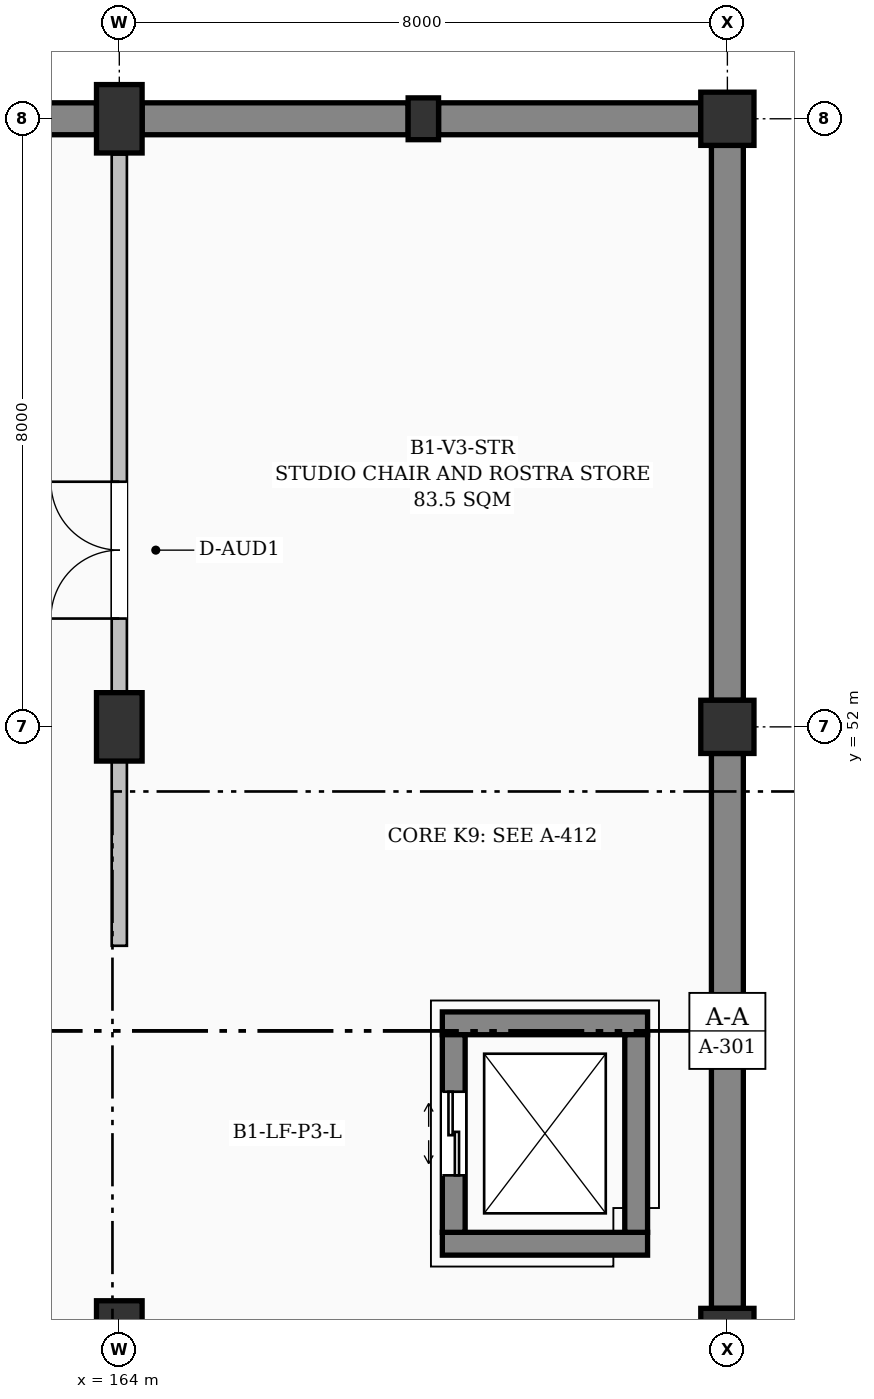
"""IFC4 building model, lengths in metres.
Left out: names, types, materials, properties, quantities, classifications, styles, units other than length and angle.
Written with IfcOpenShell. Run it as: python <this file> out.ifc"""

import sys

from ifc_helpers import new_model, si_unit, direction, frame, frame_2d, origin, origin_2d, place, context, subcontext, project, spatial, rectangle, extrude, element, fill, save


model = new_model("IFC4")
c1 = context("Model", 3, precision=1e-05, world=origin(), true_north=direction((0.0, 1.0)))
c2 = subcontext(c1, "Body", "Model", "MODEL_VIEW")
j1 = project(units=[si_unit("LENGTHUNIT", "METRE"), si_unit("PLANEANGLEUNIT", "RADIAN")], contexts=[c1])
p1 = place(None, origin())
s1 = spatial("IfcSite", under=j1, at=p1, CompositionType="ELEMENT")
p2 = place(p1, origin())
s2 = spatial("IfcBuilding", under=s1, at=p2, CompositionType="ELEMENT")
p3 = place(p2, frame((0.0, 0.0, -4.8)))
s3 = spatial("IfcBuildingStorey", under=s2, at=p3, CompositionType="ELEMENT", Elevation=-4.8)
for number, where, z_axis, x_axis in (
    (1, (164.0, 44.0, -0.38), (0.0, 0.0, 1.0), (1.0, 0.0, 0.0)),
    (2, (164.0, 52.0, -0.38), (0.0, 0.0, 1.0), (1.0, 0.0, 0.0)),
    (3, (164.0, 60.0, -0.38), (0.0, 0.0, 1.0), (1.0, 0.0, 0.0)),
):
    element("IfcColumn", number, at=place(p3, frame(where, z_axis=z_axis, x_axis=x_axis)), inside=s3, PredefinedType="COLUMN", context=c2, shape_type="SweptSolid", body=[
        extrude(rectangle(XDim=0.6, YDim=0.9, at=origin_2d()), origin(), (0.0, 0.0, 1.0), 5.18),
    ])
p4 = place(p3, frame((168.0, 60.0, -0.38), z_axis=(0.0, 0.0, 1.0), x_axis=(1.0, 0.0, 0.0)))
e4 = element("IfcColumn", 4, at=p4, inside=s3, PredefinedType="PILASTER", context=c2, shape_type="SweptSolid", body=[
    extrude(rectangle(XDim=0.4, YDim=0.55, at=origin_2d()), origin(), (0.0, 0.0, 1.0), 5.18),
])
for number, where, z_axis, x_axis in (
    (5, (172.0, 44.0, -0.38), (0.0, 0.0, 1.0), (1.0, 0.0, 0.0)),
    (6, (172.0, 52.0, -0.38), (0.0, 0.0, 1.0), (1.0, 0.0, 0.0)),
    (7, (172.0, 60.0, -0.38), (0.0, 0.0, 1.0), (1.0, 0.0, 0.0)),
):
    element("IfcColumn", number, at=place(p3, frame(where, z_axis=z_axis, x_axis=x_axis)), inside=s3, PredefinedType="COLUMN", context=c2, shape_type="SweptSolid", body=[
        extrude(rectangle(XDim=0.7, YDim=0.7, at=origin_2d()), origin(), (0.0, 0.0, 1.0), 5.18),
    ])
p5 = place(p3, frame((160.225, 60.0, 0.0), z_axis=(0.0, 0.0, 1.0), x_axis=(1.0, 0.0, 0.0)))
e8 = element("IfcWall", 8, at=p5, inside=s3, PredefinedType="USERDEFINED", context=c2, shape_type="SweptSolid", body=[
    extrude(rectangle(XDim=3.475, YDim=0.42, at=frame_2d((1.737, 0.0))), origin(), (0.0, 0.0, 1.0), 3.85),
])
p6 = place(p3, frame((164.3, 60.0, 0.0), z_axis=(0.0, 0.0, 1.0), x_axis=(1.0, 0.0, 0.0)))
e9 = element("IfcWall", 9, at=p6, inside=s3, PredefinedType="USERDEFINED", context=c2, shape_type="SweptSolid", body=[
    extrude(rectangle(XDim=3.5, YDim=0.42, at=frame_2d((1.75, 0.0))), origin(), (0.0, 0.0, 1.0), 3.85),
])
p7 = place(p3, frame((168.2, 60.0, 0.0), z_axis=(0.0, 0.0, 1.0), x_axis=(1.0, 0.0, 0.0)))
e10 = element("IfcWall", 10, at=p7, inside=s3, PredefinedType="USERDEFINED", context=c2, shape_type="SweptSolid", body=[
    extrude(rectangle(XDim=3.45, YDim=0.42, at=frame_2d((1.725, 0.0))), origin(), (0.0, 0.0, 1.0), 3.85),
])
for number, where, z_axis, x_axis in (
    (11, (172.0, 59.65, 0.0), (0.0, 0.0, 1.0), (0.0, -1.0, 0.0)),
    (12, (172.0, 51.65, 0.0), (0.0, 0.0, 1.0), (0.0, -1.0, 0.0)),
):
    element("IfcWall", number, at=place(p3, frame(where, z_axis=z_axis, x_axis=x_axis)), inside=s3, PredefinedType="USERDEFINED", context=c2, shape_type="SweptSolid", body=[
        extrude(rectangle(XDim=7.3, YDim=0.42, at=frame_2d((3.65, 0.0))), origin(), (0.0, 0.0, 1.0), 3.85),
    ])
for number, where, z_axis, x_axis in (
    (13, (168.25, 45.2, -1.2), (0.0, 0.0, 1.0), (1.0, 0.0, 0.0)),
    (14, (170.95, 48.1, -1.2), (0.0, 0.0, 1.0), (-1.0, 0.0, 0.0)),
):
    element("IfcWall", number, at=place(p3, frame(where, z_axis=z_axis, x_axis=x_axis)), inside=s3, PredefinedType="SHEAR", context=c2, shape_type="SweptSolid", body=[
        extrude(rectangle(XDim=2.7, YDim=0.3, at=frame_2d((1.35, 0.0))), origin(), (0.0, 0.0, 1.0), 5.7),
    ])
p8 = place(p3, frame((168.4, 45.35, -1.2), z_axis=(0.0, 0.0, 1.0), x_axis=(0.0, 1.0, 0.0)))
e15 = element("IfcWall", 15, at=p8, inside=s3, PredefinedType="SHEAR", context=c2, shape_type="SweptSolid", body=[
    extrude(rectangle(XDim=2.6, YDim=0.3, at=frame_2d((1.3, 0.0))), origin(), (0.0, 0.0, 1.0), 5.7),
])
p9 = place(p8, frame((0.75, 0.0, 1.2)))
e16 = element("IfcOpeningElement", 16, at=p9, cuts=e15, PredefinedType="OPENING", context=c2, shape_type="SweptSolid", body=[
    extrude(rectangle(XDim=1.1, YDim=2.15, at=frame_2d((0.55, 1.075))), frame((0.0, 0.16, 0.0), z_axis=(0.0, -1.0, 0.0), x_axis=(1.0, 0.0, 0.0)), (0.0, 0.0, 1.0), 0.32),
])
p10 = place(p3, frame((170.8, 47.95, -1.2), z_axis=(0.0, 0.0, 1.0), x_axis=(0.0, -1.0, 0.0)))
e17 = element("IfcWall", 17, at=p10, inside=s3, PredefinedType="SHEAR", context=c2, shape_type="SweptSolid", body=[
    extrude(rectangle(XDim=2.6, YDim=0.3, at=frame_2d((1.3, 0.0))), origin(), (0.0, 0.0, 1.0), 5.7),
])
p11 = place(p3, frame((164.0, 49.12, 0.0), z_axis=(0.0, 0.0, 1.0), x_axis=(0.0, 1.0, 0.0)))
e18 = element("IfcWall", 18, at=p11, inside=s3, PredefinedType="PARTITIONING", context=c2, shape_type="SweptSolid", body=[
    extrude(rectangle(XDim=10.41, YDim=0.2, at=frame_2d((5.205, 0.0))), origin(), (0.0, 0.0, 1.0), 3.885),
])
p12 = place(p11, frame((4.305, 0.0, 0.0)))
e19 = element("IfcOpeningElement", 19, at=p12, cuts=e18, PredefinedType="OPENING", context=c2, shape_type="SweptSolid", body=[
    extrude(rectangle(XDim=1.8, YDim=2.35, at=frame_2d((0.9, 1.175))), frame((0.0, 0.11, 0.0), z_axis=(0.0, -1.0, 0.0), x_axis=(1.0, 0.0, 0.0)), (0.0, 0.0, 1.0), 0.22),
])
p13 = place(p9, origin())
e20 = element("IfcDoor", 20, at=p13, inside=s3, OperationType="DOUBLE_DOOR_SLIDING", PredefinedType="DOOR", context=c2, shape_type="SweptSolid", body=[
    extrude(rectangle(XDim=1.1, YDim=2.15, at=frame_2d((0.55, 1.075))), frame((0.0, 0.025, 0.0), z_axis=(0.0, -1.0, 0.0), x_axis=(1.0, 0.0, 0.0)), (0.0, 0.0, 1.0), 0.05),
])
fill(e16, e20)
p14 = place(p12, origin())
e21 = element("IfcDoor", 21, at=p14, inside=s3, OperationType="DOUBLE_DOOR_SINGLE_SWING", PredefinedType="DOOR", context=c2, shape_type="SweptSolid", body=[
    extrude(rectangle(XDim=1.8, YDim=2.35, at=frame_2d((0.9, 1.175))), frame((0.0, 0.025, 0.0), z_axis=(0.0, -1.0, 0.0), x_axis=(1.0, 0.0, 0.0)), (0.0, 0.0, 1.0), 0.05),
])
fill(e19, e21)
save(model, sys.argv[1])
